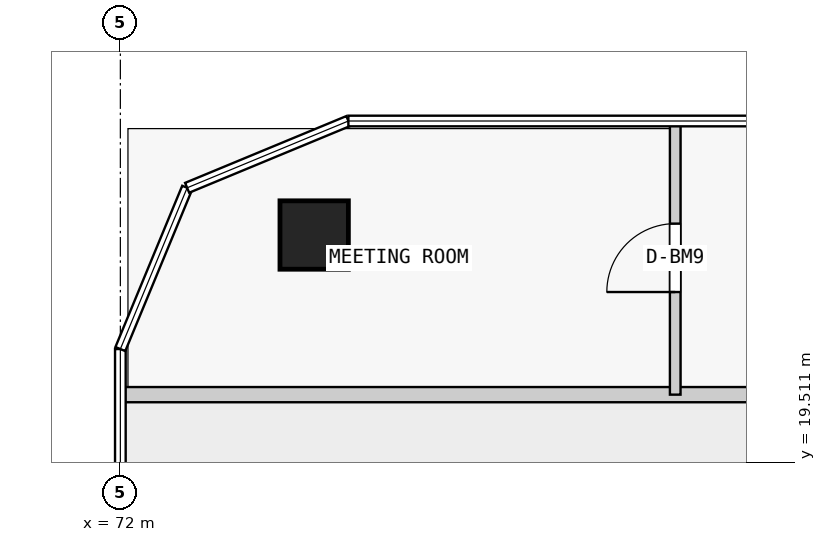
"""IFC4 building model, lengths in metres.
Left out: names, types, materials, properties, quantities, classifications, styles, units other than length and angle.
Written with IfcOpenShell. Run it as: python <this file> out.ifc"""

import sys

from ifc_helpers import new_model, si_unit, direction, frame, frame_2d, origin, origin_2d, place, context, subcontext, project, spatial, rectangle, extrude, element, fill, save


model = new_model("IFC4")
c1 = context("Model", 3, precision=1e-05, world=origin(), true_north=direction((0.0, 1.0)))
c2 = subcontext(c1, "Body", "Model", "MODEL_VIEW")
j1 = project(units=[si_unit("LENGTHUNIT", "METRE"), si_unit("PLANEANGLEUNIT", "RADIAN")], contexts=[c1])
p1 = place(None, origin())
s1 = spatial("IfcSite", under=j1, at=p1, CompositionType="ELEMENT")
p2 = place(p1, origin())
s2 = spatial("IfcBuilding", under=s1, at=p2, CompositionType="ELEMENT")
p3 = place(p2, frame((0.0, 0.0, 47.8)))
s3 = spatial("IfcBuildingStorey", under=s2, at=p3, CompositionType="ELEMENT", Elevation=47.8)
p4 = place(p3, frame((74.55, 22.5, 0.0), z_axis=(0.0, 0.0, 1.0), x_axis=(1.0, 0.0, 0.0)))
e1 = element("IfcColumn", 1, at=p4, inside=s3, PredefinedType="COLUMN", context=c2, shape_type="SweptSolid", body=[
    extrude(rectangle(XDim=0.9, YDim=0.9, at=origin_2d()), origin(), (0.0, 0.0, 1.0), 3.5),
])
p5 = place(p3, frame((72.0, 20.4, 0.0), z_axis=(0.0, 0.0, 1.0), x_axis=(1.0, 0.0, 0.0)))
e2 = element("IfcWall", 2, at=p5, inside=s3, PredefinedType="PARTITIONING", context=c2, shape_type="SweptSolid", body=[
    extrude(rectangle(XDim=20.0, YDim=0.2, at=frame_2d((10.0, 0.0))), origin(), (0.0, 0.0, 1.0), 3.25),
])
p6 = place(p3, frame((79.3, 20.4, 0.0), z_axis=(0.0, 0.0, 1.0), x_axis=(0.0, 1.0, 0.0)))
e3 = element("IfcWall", 3, at=p6, inside=s3, PredefinedType="PARTITIONING", context=c2, shape_type="SweptSolid", body=[
    extrude(rectangle(XDim=3.6, YDim=0.14, at=frame_2d((1.8, 0.0))), origin(), (0.0, 0.0, 1.0), 3.25),
])
p7 = place(p6, frame((1.35, 0.0, 0.0)))
e4 = element("IfcOpeningElement", 4, at=p7, cuts=e3, PredefinedType="OPENING", context=c2, shape_type="SweptSolid", body=[
    extrude(rectangle(XDim=0.9, YDim=2.4, at=frame_2d((0.45, 1.2))), frame((0.0, 0.08, 0.0), z_axis=(0.0, -1.0, 0.0), x_axis=(1.0, 0.0, 0.0)), (0.0, 0.0, 1.0), 0.16),
])
p8 = place(p7, origin())
e5 = element("IfcDoor", 5, at=p8, inside=s3, OperationType="SINGLE_SWING_LEFT", PredefinedType="DOOR", context=c2, shape_type="SweptSolid", body=[
    extrude(rectangle(XDim=0.9, YDim=2.4, at=frame_2d((0.45, 1.2))), frame((0.0, 0.025, 0.0), z_axis=(0.0, -1.0, 0.0), x_axis=(1.0, 0.0, 0.0)), (0.0, 0.0, 1.0), 0.05),
])
fill(e4, e5)
save(model, sys.argv[1])
